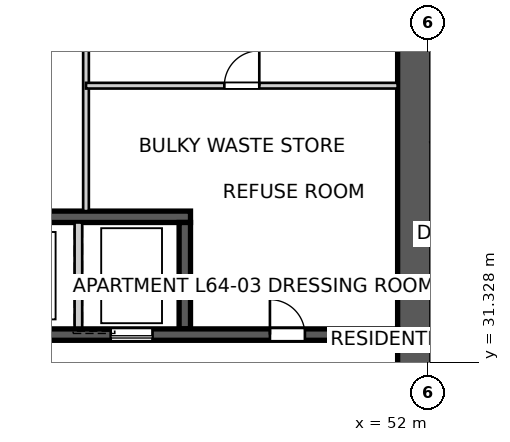
"""IFC4 building model, lengths in metres.
Left out: names, types, materials, properties, quantities, classifications, styles, units other than length and angle.
Written with IfcOpenShell. Run it as: python <this file> out.ifc"""

import sys

from ifc_helpers import new_model, si_unit, direction, frame, frame_2d, origin, place, context, subcontext, project, spatial, polyline, rectangle, outline, extrude, element, fill, save


model = new_model("IFC4")
c1 = context("Model", 3, precision=1e-05, world=origin(), true_north=direction((0.0, 1.0)))
c2 = subcontext(c1, "Body", "Model", "MODEL_VIEW")
j1 = project(units=[si_unit("LENGTHUNIT", "METRE"), si_unit("PLANEANGLEUNIT", "RADIAN")], contexts=[c1])
p1 = place(None, origin())
s1 = spatial("IfcSite", under=j1, at=p1, CompositionType="ELEMENT")
p2 = place(p1, origin())
s2 = spatial("IfcBuilding", under=s1, at=p2, CompositionType="ELEMENT")
p3 = place(p2, frame((0.0, 0.0, 232.0)))
s3 = spatial("IfcBuildingStorey", under=s2, at=p3, CompositionType="ELEMENT", Elevation=232.0)
p4 = place(p3, frame((51.65, 18.8, 0.0), z_axis=(0.0, 0.0, 1.0), x_axis=(0.0, 1.0, 0.0)))
e1 = element("IfcWall", 1, at=p4, inside=s3, PredefinedType="SHEAR", context=c2, shape_type="SweptSolid", body=[
    extrude(outline(polyline([(0.0, -0.45), (22.4, -0.45), (22.4, -0.025), (22.85, -0.025), (22.85, 0.025), (22.4, 0.025), (22.4, 0.45), (0.0, 0.45), (0.0, 0.025), (-0.45, 0.025), (-0.45, -0.025), (0.0, -0.025), (0.0, -0.45)])), origin(), (0.0, 0.0, 1.0), 3.4),
])
p5 = place(p4, frame((11.14, 0.0, 0.0)))
e2 = element("IfcOpeningElement", 2, at=p5, cuts=e1, PredefinedType="OPENING", context=c2, shape_type="SweptSolid", body=[
    extrude(rectangle(XDim=1.02, YDim=2.4, at=frame_2d((0.51, 1.2))), frame((0.0, 0.46, 0.0), z_axis=(0.0, -1.0, 0.0), x_axis=(1.0, 0.0, 0.0)), (0.0, 0.0, 1.0), 0.92),
])
p6 = place(p3, frame((28.8, 32.05, 0.0), z_axis=(0.0, 0.0, 1.0), x_axis=(1.0, 0.0, 0.0)))
e3 = element("IfcWall", 3, at=p6, inside=s3, PredefinedType="SHEAR", context=c2, shape_type="SweptSolid", body=[
    extrude(rectangle(XDim=22.4, YDim=0.3, at=frame_2d((11.2, 0.0))), origin(), (0.0, 0.0, 1.0), 3.4),
])
p7 = place(p6, frame((19.04, 0.0, 0.0)))
e4 = element("IfcOpeningElement", 4, at=p7, cuts=e3, PredefinedType="OPENING", context=c2, shape_type="SweptSolid", body=[
    extrude(rectangle(XDim=0.92, YDim=2.1, at=frame_2d((0.46, 1.05))), frame((0.0, 0.16, 0.0), z_axis=(0.0, -1.0, 0.0), x_axis=(1.0, 0.0, 0.0)), (0.0, 0.0, 1.0), 0.32),
])
p8 = place(p6, frame((1.265, 0.0, 0.0)))
e5 = element("IfcOpeningElement", 5, at=p8, cuts=e3, PredefinedType="OPENING", context=c2, shape_type="SweptSolid", body=[
    extrude(rectangle(XDim=1.02, YDim=2.1, at=frame_2d((0.51, 1.05))), frame((0.0, 0.16, 0.0), z_axis=(0.0, -1.0, 0.0), x_axis=(1.0, 0.0, 0.0)), (0.0, 0.0, 1.0), 0.32),
])
p9 = place(p6, frame((4.015, 0.0, 0.0)))
e6 = element("IfcOpeningElement", 6, at=p9, cuts=e3, PredefinedType="OPENING", context=c2, shape_type="SweptSolid", body=[
    extrude(rectangle(XDim=0.92, YDim=2.1, at=frame_2d((0.46, 1.05))), frame((0.0, 0.16, 0.0), z_axis=(0.0, -1.0, 0.0), x_axis=(1.0, 0.0, 0.0)), (0.0, 0.0, 1.0), 0.32),
])
p10 = place(p6, frame((6.115, 0.0, 0.0)))
e7 = element("IfcOpeningElement", 7, at=p10, cuts=e3, PredefinedType="OPENING", context=c2, shape_type="SweptSolid", body=[
    extrude(rectangle(XDim=0.92, YDim=2.1, at=frame_2d((0.46, 1.05))), frame((0.0, 0.16, 0.0), z_axis=(0.0, -1.0, 0.0), x_axis=(1.0, 0.0, 0.0)), (0.0, 0.0, 1.0), 0.32),
])
p11 = place(p6, frame((9.79, 0.0, 0.0)))
e8 = element("IfcOpeningElement", 8, at=p11, cuts=e3, PredefinedType="OPENING", context=c2, shape_type="SweptSolid", body=[
    extrude(rectangle(XDim=0.92, YDim=2.1, at=frame_2d((0.46, 1.05))), frame((0.0, 0.16, 0.0), z_axis=(0.0, -1.0, 0.0), x_axis=(1.0, 0.0, 0.0)), (0.0, 0.0, 1.0), 0.32),
])
p12 = place(p6, frame((12.05, 0.0, 0.0)))
e9 = element("IfcOpeningElement", 9, at=p12, cuts=e3, PredefinedType="OPENING", context=c2, shape_type="SweptSolid", body=[
    extrude(rectangle(XDim=1.1, YDim=2.1, at=frame_2d((0.55, 1.05))), frame((0.0, 0.16, 0.0), z_axis=(0.0, -1.0, 0.0), x_axis=(1.0, 0.0, 0.0)), (0.0, 0.0, 1.0), 0.32),
])
p13 = place(p6, frame((14.85, 0.0, 0.0)))
e10 = element("IfcOpeningElement", 10, at=p13, cuts=e3, PredefinedType="OPENING", context=c2, shape_type="SweptSolid", body=[
    extrude(rectangle(XDim=1.1, YDim=2.1, at=frame_2d((0.55, 1.05))), frame((0.0, 0.16, 0.0), z_axis=(0.0, -1.0, 0.0), x_axis=(1.0, 0.0, 0.0)), (0.0, 0.0, 1.0), 0.32),
])
p14 = place(p3, frame((34.25, 35.15, 0.0), z_axis=(0.0, 0.0, 1.0), x_axis=(1.0, 0.0, 0.0)))
e11 = element("IfcWall", 11, at=p14, inside=s3, PredefinedType="SHEAR", context=c2, shape_type="SweptSolid", body=[
    extrude(rectangle(XDim=11.5, YDim=0.3, at=frame_2d((5.75, 0.0))), origin(), (0.0, 0.0, 1.0), 3.4),
])
p15 = place(p3, frame((42.8, 32.2, 0.0), z_axis=(0.0, 0.0, 1.0), x_axis=(0.0, 1.0, 0.0)))
e12 = element("IfcWall", 12, at=p15, inside=s3, PredefinedType="SOLIDWALL", context=c2, shape_type="SweptSolid", body=[
    extrude(rectangle(XDim=2.8, YDim=0.2, at=frame_2d((1.4, 0.0))), origin(), (0.0, 0.0, 1.0), 3.4),
])
p16 = place(p3, frame((45.6, 32.2, 0.0), z_axis=(0.0, 0.0, 1.0), x_axis=(0.0, 1.0, 0.0)))
e13 = element("IfcWall", 13, at=p16, inside=s3, PredefinedType="SHEAR", context=c2, shape_type="SweptSolid", body=[
    extrude(rectangle(XDim=2.8, YDim=0.3, at=frame_2d((1.4, 0.0))), origin(), (0.0, 0.0, 1.0), 3.4),
])
p17 = place(p3, frame((59.486, 41.25, 0.0), z_axis=(0.0, 0.0, 1.0), x_axis=(-0.866020489494, -0.500008511703, 0.0)))
e14 = element("IfcWall", 14, at=p17, inside=s3, PredefinedType="PARTITIONING", context=c2, shape_type="SweptSolid", body=[
    extrude(rectangle(XDim=8.496, YDim=0.25, at=frame_2d((4.248, 0.0))), origin(), (0.0, 0.0, 1.0), 3.2),
])
p18 = place(p3, frame((43.0, 41.2, 0.0), z_axis=(0.0, 0.0, 1.0), x_axis=(0.0, -1.0, 0.0)))
e15 = element("IfcWall", 15, at=p18, inside=s3, PredefinedType="SOLIDWALL", context=c2, shape_type="SweptSolid", body=[
    extrude(rectangle(XDim=5.9, YDim=0.15, at=frame_2d((2.95, 0.0))), origin(), (0.0, 0.0, 1.0), 3.2),
])
p19 = place(p3, frame((43.0, 38.6, 0.0), z_axis=(0.0, 0.0, 1.0), x_axis=(1.0, 0.0, 0.0)))
e16 = element("IfcWall", 16, at=p19, inside=s3, PredefinedType="SOLIDWALL", context=c2, shape_type="SweptSolid", body=[
    extrude(rectangle(XDim=8.2, YDim=0.15, at=frame_2d((4.1, 0.0))), origin(), (0.0, 0.0, 1.0), 3.2),
])
p20 = place(p19, frame((3.64, 0.0, 0.0)))
e17 = element("IfcOpeningElement", 17, at=p20, cuts=e16, PredefinedType="OPENING", context=c2, shape_type="SweptSolid", body=[
    extrude(rectangle(XDim=0.92, YDim=2.1, at=frame_2d((0.46, 1.05))), frame((0.0, 0.085, 0.0), z_axis=(0.0, -1.0, 0.0), x_axis=(1.0, 0.0, 0.0)), (0.0, 0.0, 1.0), 0.17),
])
p21 = place(p7, origin())
e18 = element("IfcDoor", 18, at=p21, inside=s3, OperationType="SINGLE_SWING_LEFT", PredefinedType="DOOR", context=c2, shape_type="SweptSolid", body=[
    extrude(rectangle(XDim=0.92, YDim=2.1, at=frame_2d((0.46, 1.05))), frame((0.0, 0.025, 0.0), z_axis=(0.0, -1.0, 0.0), x_axis=(1.0, 0.0, 0.0)), (0.0, 0.0, 1.0), 0.05),
])
fill(e4, e18)
p22 = place(p20, origin())
e19 = element("IfcDoor", 19, at=p22, inside=s3, OperationType="SINGLE_SWING_RIGHT", PredefinedType="DOOR", context=c2, shape_type="SweptSolid", body=[
    extrude(rectangle(XDim=0.92, YDim=2.1, at=frame_2d((0.46, 1.05))), frame((0.0, 0.025, 0.0), z_axis=(0.0, -1.0, 0.0), x_axis=(1.0, 0.0, 0.0)), (0.0, 0.0, 1.0), 0.05),
])
fill(e17, e19)
p23 = place(p13, origin())
e20 = element("IfcDoor", 20, at=p23, inside=s3, OperationType="SLIDING_TO_LEFT", PredefinedType="DOOR", context=c2, shape_type="SweptSolid", body=[
    extrude(rectangle(XDim=1.1, YDim=2.1, at=frame_2d((0.55, 1.05))), frame((0.0, 0.025, 0.0), z_axis=(0.0, -1.0, 0.0), x_axis=(1.0, 0.0, 0.0)), (0.0, 0.0, 1.0), 0.05),
])
fill(e10, e20)
save(model, sys.argv[1])
